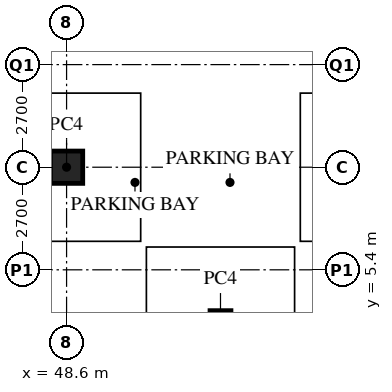
"""IFC4 building model, lengths in metres.
Left out: names, types, materials, properties, quantities, classifications, styles, units other than length and angle.
Written with IfcOpenShell. Run it as: python <this file> out.ifc"""

import sys

from ifc_helpers import new_model, si_unit, direction, frame, origin, origin_2d, place, context, subcontext, project, spatial, hollow_rectangle, extrude, element, save


model = new_model("IFC4")
c1 = context("Model", 3, precision=1e-05, world=origin(), true_north=direction((0.0, 1.0)))
c2 = subcontext(c1, "Body", "Model", "MODEL_VIEW")
j1 = project(units=[si_unit("LENGTHUNIT", "METRE"), si_unit("PLANEANGLEUNIT", "RADIAN")], contexts=[c1])
p1 = place(None, origin())
s1 = spatial("IfcSite", under=j1, at=p1, CompositionType="ELEMENT")
p2 = place(p1, origin())
s2 = spatial("IfcBuilding", under=s1, at=p2, CompositionType="ELEMENT")
p3 = place(p2, frame((0.0, 0.0, -8.4)))
s3 = spatial("IfcBuildingStorey", under=s2, at=p3, CompositionType="ELEMENT", Elevation=-8.4)
p4 = place(p3, frame((48.6, 8.1, 0.0), z_axis=(0.0, 0.0, 1.0), x_axis=(1.0, 0.0, 0.0)))
e1 = element("IfcColumn", 1, at=p4, inside=s3, PredefinedType="COLUMN", context=c2, shape_type="SweptSolid", body=[
    extrude(hollow_rectangle(XDim=0.85, YDim=0.85, WallThickness=0.085, at=origin_2d()), origin(), (0.0, 0.0, 1.0), 4.2),
])
p5 = place(p3, frame((52.65, 4.05, 0.0), z_axis=(0.0, 0.0, 1.0), x_axis=(1.0, 0.0, 0.0)))
e2 = element("IfcColumn", 2, at=p5, inside=s3, PredefinedType="COLUMN", context=c2, shape_type="SweptSolid", body=[
    extrude(hollow_rectangle(XDim=0.55, YDim=0.55, WallThickness=0.05, at=origin_2d()), origin(), (0.0, 0.0, 1.0), 4.2),
])
save(model, sys.argv[1])
